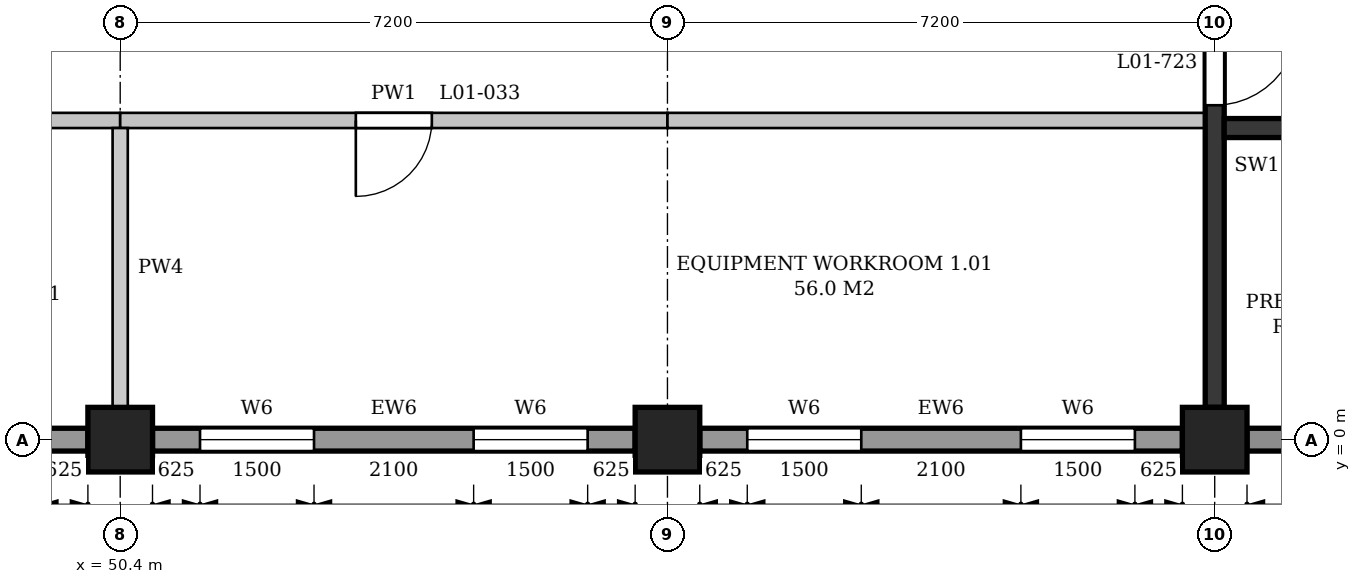
"""IFC4 building model, lengths in metres.
Left out: names, types, materials, properties, quantities, classifications, styles, units other than length and angle.
Written with IfcOpenShell. Run it as: python <this file> out.ifc"""

import sys

from ifc_helpers import new_model, si_unit, direction, frame, frame_2d, origin, origin_2d, place, context, subcontext, project, spatial, polyline, rectangle, outline, extrude, element, fill, save


model = new_model("IFC4")
c1 = context("Model", 3, precision=1e-05, world=origin(), true_north=direction((0.0, 1.0)))
c2 = subcontext(c1, "Body", "Model", "MODEL_VIEW")
j1 = project(units=[si_unit("LENGTHUNIT", "METRE"), si_unit("PLANEANGLEUNIT", "RADIAN")], contexts=[c1])
p1 = place(None, origin())
s1 = spatial("IfcSite", under=j1, at=p1, CompositionType="ELEMENT")
p2 = place(p1, origin())
s2 = spatial("IfcBuilding", under=s1, at=p2, CompositionType="ELEMENT")
p3 = place(p2, frame((0.0, 0.0, 6.0)))
s3 = spatial("IfcBuildingStorey", under=s2, at=p3, CompositionType="ELEMENT", Elevation=6.0)
for number, where, z_axis, x_axis in (
    (1, (50.4, 0.0, 0.0), (0.0, 0.0, 1.0), (1.0, 0.0, 0.0)),
    (2, (57.6, 0.0, 0.0), (0.0, 0.0, 1.0), (1.0, 0.0, 0.0)),
    (3, (64.8, 0.0, 0.0), (0.0, 0.0, 1.0), (1.0, 0.0, 0.0)),
):
    element("IfcColumn", number, at=place(p3, frame(where, z_axis=z_axis, x_axis=x_axis)), inside=s3, PredefinedType="COLUMN", context=c2, shape_type="SweptSolid", body=[
        extrude(rectangle(XDim=0.85, YDim=0.85, at=origin_2d()), origin(), (0.0, 0.0, 1.0), 5.4),
    ])
p4 = place(p3, frame((43.625, 0.0, 0.0), z_axis=(0.0, 0.0, 1.0), x_axis=(1.0, 0.0, 0.0)))
e4 = element("IfcWall", 4, at=p4, inside=s3, PredefinedType="STANDARD", context=c2, shape_type="SweptSolid", body=[
    extrude(rectangle(XDim=6.35, YDim=0.3, at=frame_2d((3.175, 0.0))), origin(), (0.0, 0.0, 1.0), 4.7),
])
p5 = place(p4, frame((0.625, 0.0, 0.9)))
e5 = element("IfcOpeningElement", 5, at=p5, cuts=e4, PredefinedType="OPENING", context=c2, shape_type="SweptSolid", body=[
    extrude(outline(polyline([(0.0, 0.0), (1.5, 0.0), (1.5, 2.85), (0.75, 3.6), (0.0, 2.85), (0.0, 0.0)])), frame((0.0, 0.16, 0.0), z_axis=(0.0, -1.0, 0.0), x_axis=(1.0, 0.0, 0.0)), (0.0, 0.0, 1.0), 0.32),
])
p6 = place(p4, frame((4.225, 0.0, 0.9)))
e6 = element("IfcOpeningElement", 6, at=p6, cuts=e4, PredefinedType="OPENING", context=c2, shape_type="SweptSolid", body=[
    extrude(outline(polyline([(0.0, 0.0), (1.5, 0.0), (1.5, 2.85), (0.75, 3.6), (0.0, 2.85), (0.0, 0.0)])), frame((0.0, 0.16, 0.0), z_axis=(0.0, -1.0, 0.0), x_axis=(1.0, 0.0, 0.0)), (0.0, 0.0, 1.0), 0.32),
])
p7 = place(p3, frame((50.825, 0.0, 0.0), z_axis=(0.0, 0.0, 1.0), x_axis=(1.0, 0.0, 0.0)))
e7 = element("IfcWall", 7, at=p7, inside=s3, PredefinedType="STANDARD", context=c2, shape_type="SweptSolid", body=[
    extrude(rectangle(XDim=6.35, YDim=0.3, at=frame_2d((3.175, 0.0))), origin(), (0.0, 0.0, 1.0), 4.7),
])
p8 = place(p7, frame((0.625, 0.0, 0.9)))
e8 = element("IfcOpeningElement", 8, at=p8, cuts=e7, PredefinedType="OPENING", context=c2, shape_type="SweptSolid", body=[
    extrude(outline(polyline([(0.0, 0.0), (1.5, 0.0), (1.5, 2.85), (0.75, 3.6), (0.0, 2.85), (0.0, 0.0)])), frame((0.0, 0.16, 0.0), z_axis=(0.0, -1.0, 0.0), x_axis=(1.0, 0.0, 0.0)), (0.0, 0.0, 1.0), 0.32),
])
p9 = place(p7, frame((4.225, 0.0, 0.9)))
e9 = element("IfcOpeningElement", 9, at=p9, cuts=e7, PredefinedType="OPENING", context=c2, shape_type="SweptSolid", body=[
    extrude(outline(polyline([(0.0, 0.0), (1.5, 0.0), (1.5, 2.85), (0.75, 3.6), (0.0, 2.85), (0.0, 0.0)])), frame((0.0, 0.16, 0.0), z_axis=(0.0, -1.0, 0.0), x_axis=(1.0, 0.0, 0.0)), (0.0, 0.0, 1.0), 0.32),
])
p10 = place(p3, frame((58.025, 0.0, 0.0), z_axis=(0.0, 0.0, 1.0), x_axis=(1.0, 0.0, 0.0)))
e10 = element("IfcWall", 10, at=p10, inside=s3, PredefinedType="STANDARD", context=c2, shape_type="SweptSolid", body=[
    extrude(rectangle(XDim=6.35, YDim=0.3, at=frame_2d((3.175, 0.0))), origin(), (0.0, 0.0, 1.0), 4.7),
])
p11 = place(p10, frame((0.625, 0.0, 0.9)))
e11 = element("IfcOpeningElement", 11, at=p11, cuts=e10, PredefinedType="OPENING", context=c2, shape_type="SweptSolid", body=[
    extrude(outline(polyline([(0.0, 0.0), (1.5, 0.0), (1.5, 2.85), (0.75, 3.6), (0.0, 2.85), (0.0, 0.0)])), frame((0.0, 0.16, 0.0), z_axis=(0.0, -1.0, 0.0), x_axis=(1.0, 0.0, 0.0)), (0.0, 0.0, 1.0), 0.32),
])
p12 = place(p10, frame((4.225, 0.0, 0.9)))
e12 = element("IfcOpeningElement", 12, at=p12, cuts=e10, PredefinedType="OPENING", context=c2, shape_type="SweptSolid", body=[
    extrude(outline(polyline([(0.0, 0.0), (1.5, 0.0), (1.5, 2.85), (0.75, 3.6), (0.0, 2.85), (0.0, 0.0)])), frame((0.0, 0.16, 0.0), z_axis=(0.0, -1.0, 0.0), x_axis=(1.0, 0.0, 0.0)), (0.0, 0.0, 1.0), 0.32),
])
p13 = place(p3, frame((65.225, 0.0, 0.0), z_axis=(0.0, 0.0, 1.0), x_axis=(1.0, 0.0, 0.0)))
e13 = element("IfcWall", 13, at=p13, inside=s3, PredefinedType="STANDARD", context=c2, shape_type="SweptSolid", body=[
    extrude(rectangle(XDim=6.35, YDim=0.3, at=frame_2d((3.175, 0.0))), origin(), (0.0, 0.0, 1.0), 4.7),
])
p14 = place(p13, frame((4.525, 0.0, 0.9)))
e14 = element("IfcOpeningElement", 14, at=p14, cuts=e13, PredefinedType="OPENING", context=c2, shape_type="SweptSolid", body=[
    extrude(outline(polyline([(0.0, 0.0), (0.9, 0.0), (0.9, 3.15), (0.45, 3.6), (0.0, 3.15), (0.0, 0.0)])), frame((0.0, 0.16, 0.0), z_axis=(0.0, -1.0, 0.0), x_axis=(1.0, 0.0, 0.0)), (0.0, 0.0, 1.0), 0.32),
])
p15 = place(p3, frame((64.8, 0.425, 0.0), z_axis=(0.0, 0.0, 1.0), x_axis=(0.0, 1.0, 0.0)))
e15 = element("IfcWall", 15, at=p15, inside=s3, PredefinedType="SHEAR", context=c2, shape_type="SweptSolid", body=[
    extrude(rectangle(XDim=6.35, YDim=0.25, at=frame_2d((3.175, 0.0))), origin(), (0.0, 0.0, 1.0), 4.7),
])
p16 = place(p15, frame((3.975, 0.0, 0.0)))
e16 = element("IfcOpeningElement", 16, at=p16, cuts=e15, PredefinedType="OPENING", context=c2, shape_type="SweptSolid", body=[
    extrude(rectangle(XDim=1.1, YDim=2.1, at=frame_2d((0.55, 1.05))), frame((0.0, 0.135, 0.0), z_axis=(0.0, -1.0, 0.0), x_axis=(1.0, 0.0, 0.0)), (0.0, 0.0, 1.0), 0.27),
])
p17 = place(p3, frame((64.925, 4.1, 0.0), z_axis=(0.0, 0.0, 1.0), x_axis=(1.0, 0.0, 0.0)))
e17 = element("IfcWall", 17, at=p17, inside=s3, PredefinedType="SHEAR", context=c2, shape_type="SweptSolid", body=[
    extrude(rectangle(XDim=2.975, YDim=0.25, at=frame_2d((1.487, 0.0))), origin(), (0.0, 0.0, 1.0), 4.7),
])
p18 = place(p17, frame((1.525, 0.0, 0.0)))
e18 = element("IfcOpeningElement", 18, at=p18, cuts=e17, PredefinedType="OPENING", context=c2, shape_type="SweptSolid", body=[
    extrude(rectangle(XDim=0.9, YDim=2.1, at=frame_2d((0.45, 1.05))), frame((0.0, 0.135, 0.0), z_axis=(0.0, -1.0, 0.0), x_axis=(1.0, 0.0, 0.0)), (0.0, 0.0, 1.0), 0.27),
])
p19 = place(p3, frame((43.2, 4.2, 0.0), z_axis=(0.0, 0.0, 1.0), x_axis=(1.0, 0.0, 0.0)))
e19 = element("IfcWall", 19, at=p19, inside=s3, PredefinedType="PARTITIONING", context=c2, shape_type="SweptSolid", body=[
    extrude(rectangle(XDim=7.2, YDim=0.2, at=frame_2d((3.6, 0.0))), origin(), (0.0, 0.0, 1.0), 4.7),
])
p20 = place(p19, frame((3.1, 0.0, 0.0)))
e20 = element("IfcOpeningElement", 20, at=p20, cuts=e19, PredefinedType="OPENING", context=c2, shape_type="SweptSolid", body=[
    extrude(rectangle(XDim=1.0, YDim=2.1, at=frame_2d((0.5, 1.05))), frame((0.0, 0.11, 0.0), z_axis=(0.0, -1.0, 0.0), x_axis=(1.0, 0.0, 0.0)), (0.0, 0.0, 1.0), 0.22),
])
p21 = place(p3, frame((50.4, 4.2, 0.0), z_axis=(0.0, 0.0, 1.0), x_axis=(1.0, 0.0, 0.0)))
e21 = element("IfcWall", 21, at=p21, inside=s3, PredefinedType="PARTITIONING", context=c2, shape_type="SweptSolid", body=[
    extrude(rectangle(XDim=7.2, YDim=0.2, at=frame_2d((3.6, 0.0))), origin(), (0.0, 0.0, 1.0), 4.7),
])
p22 = place(p21, frame((3.1, 0.0, 0.0)))
e22 = element("IfcOpeningElement", 22, at=p22, cuts=e21, PredefinedType="OPENING", context=c2, shape_type="SweptSolid", body=[
    extrude(rectangle(XDim=1.0, YDim=2.1, at=frame_2d((0.5, 1.05))), frame((0.0, 0.11, 0.0), z_axis=(0.0, -1.0, 0.0), x_axis=(1.0, 0.0, 0.0)), (0.0, 0.0, 1.0), 0.22),
])
p23 = place(p3, frame((57.6, 4.2, 0.0), z_axis=(0.0, 0.0, 1.0), x_axis=(1.0, 0.0, 0.0)))
e23 = element("IfcWall", 23, at=p23, inside=s3, PredefinedType="PARTITIONING", context=c2, shape_type="SweptSolid", body=[
    extrude(rectangle(XDim=7.075, YDim=0.2, at=frame_2d((3.538, 0.0))), origin(), (0.0, 0.0, 1.0), 4.7),
])
p24 = place(p3, frame((50.4, 0.425, 0.0), z_axis=(0.0, 0.0, 1.0), x_axis=(0.0, 1.0, 0.0)))
e24 = element("IfcWall", 24, at=p24, inside=s3, PredefinedType="PARTITIONING", context=c2, shape_type="SweptSolid", body=[
    extrude(rectangle(XDim=3.675, YDim=0.2, at=frame_2d((1.837, 0.0))), origin(), (0.0, 0.0, 1.0), 4.7),
])
p25 = place(p8, origin())
e25 = element("IfcWindow", 25, at=p25, inside=s3, PartitioningType="SINGLE_PANEL", PredefinedType="WINDOW", context=c2, shape_type="SweptSolid", body=[
    extrude(outline(polyline([(0.0, 0.0), (1.5, 0.0), (1.5, 2.85), (0.75, 3.6), (0.0, 2.85), (0.0, 0.0)])), frame((0.0, 0.03, 0.0), z_axis=(0.0, -1.0, 0.0), x_axis=(1.0, 0.0, 0.0)), (0.0, 0.0, 1.0), 0.06),
])
fill(e8, e25)
p26 = place(p9, origin())
e26 = element("IfcWindow", 26, at=p26, inside=s3, PartitioningType="SINGLE_PANEL", PredefinedType="WINDOW", context=c2, shape_type="SweptSolid", body=[
    extrude(outline(polyline([(0.0, 0.0), (1.5, 0.0), (1.5, 2.85), (0.75, 3.6), (0.0, 2.85), (0.0, 0.0)])), frame((0.0, 0.03, 0.0), z_axis=(0.0, -1.0, 0.0), x_axis=(1.0, 0.0, 0.0)), (0.0, 0.0, 1.0), 0.06),
])
fill(e9, e26)
p27 = place(p11, origin())
e27 = element("IfcWindow", 27, at=p27, inside=s3, PartitioningType="SINGLE_PANEL", PredefinedType="WINDOW", context=c2, shape_type="SweptSolid", body=[
    extrude(outline(polyline([(0.0, 0.0), (1.5, 0.0), (1.5, 2.85), (0.75, 3.6), (0.0, 2.85), (0.0, 0.0)])), frame((0.0, 0.03, 0.0), z_axis=(0.0, -1.0, 0.0), x_axis=(1.0, 0.0, 0.0)), (0.0, 0.0, 1.0), 0.06),
])
fill(e11, e27)
p28 = place(p12, origin())
e28 = element("IfcWindow", 28, at=p28, inside=s3, PartitioningType="SINGLE_PANEL", PredefinedType="WINDOW", context=c2, shape_type="SweptSolid", body=[
    extrude(outline(polyline([(0.0, 0.0), (1.5, 0.0), (1.5, 2.85), (0.75, 3.6), (0.0, 2.85), (0.0, 0.0)])), frame((0.0, 0.03, 0.0), z_axis=(0.0, -1.0, 0.0), x_axis=(1.0, 0.0, 0.0)), (0.0, 0.0, 1.0), 0.06),
])
fill(e12, e28)
p29 = place(p16, frame((1.1, 0.0, 0.0), z_axis=(0.0, 0.0, 1.0), x_axis=(-1.0, 0.0, 0.0)))
e29 = element("IfcDoor", 29, at=p29, inside=s3, OperationType="SINGLE_SWING_LEFT", PredefinedType="DOOR", context=c2, shape_type="SweptSolid", body=[
    extrude(rectangle(XDim=1.1, YDim=2.1, at=frame_2d((0.55, 1.05))), frame((0.0, 0.025, 0.0), z_axis=(0.0, -1.0, 0.0), x_axis=(1.0, 0.0, 0.0)), (0.0, 0.0, 1.0), 0.05),
])
fill(e16, e29)
p30 = place(p22, frame((1.0, 0.0, 0.0), z_axis=(0.0, 0.0, 1.0), x_axis=(-1.0, 0.0, 0.0)))
e30 = element("IfcDoor", 30, at=p30, inside=s3, OperationType="SINGLE_SWING_RIGHT", PredefinedType="DOOR", context=c2, shape_type="SweptSolid", body=[
    extrude(rectangle(XDim=1.0, YDim=2.1, at=frame_2d((0.5, 1.05))), frame((0.0, 0.025, 0.0), z_axis=(0.0, -1.0, 0.0), x_axis=(1.0, 0.0, 0.0)), (0.0, 0.0, 1.0), 0.05),
])
fill(e22, e30)
save(model, sys.argv[1])
